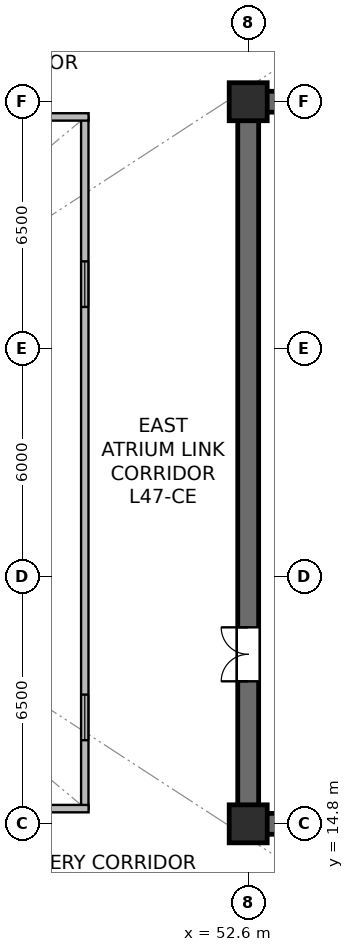
"""IFC4 building model, lengths in metres.
Left out: names, types, materials, properties, quantities, classifications, styles, units other than length and angle.
Written with IfcOpenShell. Run it as: python <this file> out.ifc"""

import sys

from ifc_helpers import new_model, si_unit, direction, frame, frame_2d, origin, origin_2d, place, context, subcontext, project, spatial, rectangle, extrude, source, transform, mapped, element, fill, save


model = new_model("IFC4")
c1 = context("Model", 3, precision=1e-05, world=origin(), true_north=direction((0.0, 1.0)))
c2 = subcontext(c1, "Body", "Model", "MODEL_VIEW")
j1 = project(units=[si_unit("LENGTHUNIT", "METRE"), si_unit("PLANEANGLEUNIT", "RADIAN")], contexts=[c1])
p1 = place(None, origin())
s1 = spatial("IfcSite", under=j1, at=p1, CompositionType="ELEMENT")
p2 = place(p1, origin())
s2 = spatial("IfcBuilding", under=s1, at=p2, CompositionType="ELEMENT")
p3 = place(p2, frame((0.0, 0.0, 196.6)))
s3 = spatial("IfcBuildingStorey", under=s2, at=p3, CompositionType="ELEMENT", Elevation=196.6)
p4 = place(p3, frame((52.325, 14.8, 0.0), z_axis=(0.0, 0.0, 1.0), x_axis=(1.0, 0.0, 0.0)))
e1 = element("IfcWall", 1, at=p4, inside=s3, PredefinedType="SHEAR", context=c2, shape_type="SweptSolid", body=[
    extrude(rectangle(XDim=15.35, YDim=0.55, at=frame_2d((7.675, 0.0))), origin(), (0.0, 0.0, 1.0), 4.5),
])
p5 = place(p3, frame((52.325, 33.8, 0.0), z_axis=(0.0, 0.0, 1.0), x_axis=(1.0, 0.0, 0.0)))
e2 = element("IfcWall", 2, at=p5, inside=s3, PredefinedType="SHEAR", context=c2, shape_type="SweptSolid", body=[
    extrude(rectangle(XDim=15.35, YDim=0.55, at=frame_2d((7.675, 0.0))), origin(), (0.0, 0.0, 1.0), 4.5),
])
p6 = place(p5, frame((6.075, 0.0, 0.0)))
e3 = element("IfcOpeningElement", 3, at=p6, cuts=e2, PredefinedType="OPENING", context=c2, shape_type="SweptSolid", body=[
    extrude(rectangle(XDim=0.95, YDim=2.15, at=frame_2d((0.475, 1.075))), frame((0.0, 0.285, 0.0), z_axis=(0.0, -1.0, 0.0), x_axis=(1.0, 0.0, 0.0)), (0.0, 0.0, 1.0), 0.57),
])
p7 = place(p5, frame((2.535, 0.0, 0.0)))
e4 = element("IfcOpeningElement", 4, at=p7, cuts=e2, PredefinedType="OPENING", context=c2, shape_type="SweptSolid", body=[
    extrude(rectangle(XDim=0.95, YDim=2.15, at=frame_2d((0.475, 1.075))), frame((0.0, 0.285, 0.0), z_axis=(0.0, -1.0, 0.0), x_axis=(1.0, 0.0, 0.0)), (0.0, 0.0, 1.0), 0.57),
])
p8 = place(p3, frame((52.6, 15.075, 0.0), z_axis=(0.0, 0.0, 1.0), x_axis=(0.0, 1.0, 0.0)))
e5 = element("IfcWall", 5, at=p8, inside=s3, PredefinedType="SHEAR", context=c2, shape_type="SweptSolid", body=[
    extrude(rectangle(XDim=18.45, YDim=0.55, at=frame_2d((9.225, 0.0))), origin(), (0.0, 0.0, 1.0), 4.5),
])
p9 = place(p8, frame((3.475, 0.0, 0.0)))
e6 = element("IfcOpeningElement", 6, at=p9, cuts=e5, PredefinedType="OPENING", context=c2, shape_type="SweptSolid", body=[
    extrude(rectangle(XDim=1.42, YDim=2.2, at=frame_2d((0.71, 1.1))), frame((0.0, 0.285, 0.0), z_axis=(0.0, -1.0, 0.0), x_axis=(1.0, 0.0, 0.0)), (0.0, 0.0, 1.0), 0.57),
])
m1 = source(origin(), c2, "Body", "SweptSolid", [
    extrude(rectangle(XDim=1.0, YDim=1.0, at=origin_2d()), origin(), (0.0, 0.0, 1.0), 4.8),
])
for number, where, z_axis, x_axis in (
    (7, (52.6, 14.8, 0.0), (0.0, 0.0, 1.0), (1.0, 0.0, 0.0)),
    (8, (52.6, 33.8, 0.0), (0.0, 0.0, 1.0), (1.0, 0.0, 0.0)),
):
    element("IfcColumn", number, at=place(p3, frame(where, z_axis=z_axis, x_axis=x_axis)), inside=s3, PredefinedType="COLUMN", context=c2, shape_type="MappedRepresentation", body=[
        mapped(m1, transform((0.0, 0.0, 0.0), scale=1.0)),
    ])
p10 = place(p3, frame((48.3, 15.2, 0.0), z_axis=(0.0, 0.0, 1.0), x_axis=(0.0, 1.0, 0.0)))
e9 = element("IfcWall", 9, at=p10, inside=s3, PredefinedType="SOLIDWALL", context=c2, shape_type="SweptSolid", body=[
    extrude(rectangle(XDim=18.2, YDim=0.195, at=frame_2d((9.1, 0.0))), origin(), (0.0, 0.0, 1.0), 4.5),
])
p11 = place(p10, frame((1.8, 0.0, 0.9)))
e10 = element("IfcOpeningElement", 10, at=p11, cuts=e9, PredefinedType="OPENING", context=c2, shape_type="SweptSolid", body=[
    extrude(rectangle(XDim=1.2, YDim=1.35, at=frame_2d((0.6, 0.675))), frame((0.0, 0.107, 0.0), z_axis=(0.0, -1.0, 0.0), x_axis=(1.0, 0.0, 0.0)), (0.0, 0.0, 1.0), 0.215),
])
p12 = place(p10, frame((13.2, 0.0, 0.9)))
e11 = element("IfcOpeningElement", 11, at=p12, cuts=e9, PredefinedType="OPENING", context=c2, shape_type="SweptSolid", body=[
    extrude(rectangle(XDim=1.2, YDim=1.35, at=frame_2d((0.6, 0.675))), frame((0.0, 0.107, 0.0), z_axis=(0.0, -1.0, 0.0), x_axis=(1.0, 0.0, 0.0)), (0.0, 0.0, 1.0), 0.215),
])
for number, where, z_axis, x_axis in (
    (12, (26.4, 15.2, 0.0), (0.0, 0.0, 1.0), (1.0, 0.0, 0.0)),
    (13, (26.4, 33.4, 0.0), (0.0, 0.0, 1.0), (1.0, 0.0, 0.0)),
):
    element("IfcWall", number, at=place(p3, frame(where, z_axis=z_axis, x_axis=x_axis)), inside=s3, PredefinedType="SOLIDWALL", context=c2, shape_type="SweptSolid", body=[
        extrude(rectangle(XDim=22.0, YDim=0.195, at=frame_2d((11.0, 0.0))), origin(), (0.0, 0.0, 1.0), 4.5),
    ])
m2 = source(origin(), c2, "Body", "SweptSolid", [
    extrude(rectangle(XDim=1.2, YDim=1.35, at=frame_2d((0.6, 0.675))), frame((0.0, 0.03, 0.0), z_axis=(0.0, -1.0, 0.0), x_axis=(1.0, 0.0, 0.0)), (0.0, 0.0, 1.0), 0.06),
])
p13 = place(p11, origin())
e14 = element("IfcWindow", 14, at=p13, inside=s3, PartitioningType="SINGLE_PANEL", PredefinedType="WINDOW", context=c2, shape_type="MappedRepresentation", body=[
    mapped(m2, transform((0.0, 0.0, 0.0), scale=1.0)),
])
fill(e10, e14)
p14 = place(p12, origin())
e15 = element("IfcWindow", 15, at=p14, inside=s3, PartitioningType="SINGLE_PANEL", PredefinedType="WINDOW", context=c2, shape_type="MappedRepresentation", body=[
    mapped(m2, transform((0.0, 0.0, 0.0), scale=1.0)),
])
fill(e11, e15)
m3 = source(origin(), c2, "Body", "SweptSolid", [
    extrude(rectangle(XDim=1.42, YDim=2.2, at=frame_2d((0.71, 1.1))), frame((0.0, 0.025, 0.0), z_axis=(0.0, -1.0, 0.0), x_axis=(1.0, 0.0, 0.0)), (0.0, 0.0, 1.0), 0.05),
])
p15 = place(p9, origin())
e16 = element("IfcDoor", 16, at=p15, inside=s3, OperationType="DOUBLE_DOOR_SINGLE_SWING", PredefinedType="DOOR", context=c2, shape_type="MappedRepresentation", body=[
    mapped(m3, transform((0.0, 0.0, 0.0), scale=1.0)),
])
fill(e6, e16)
save(model, sys.argv[1])
